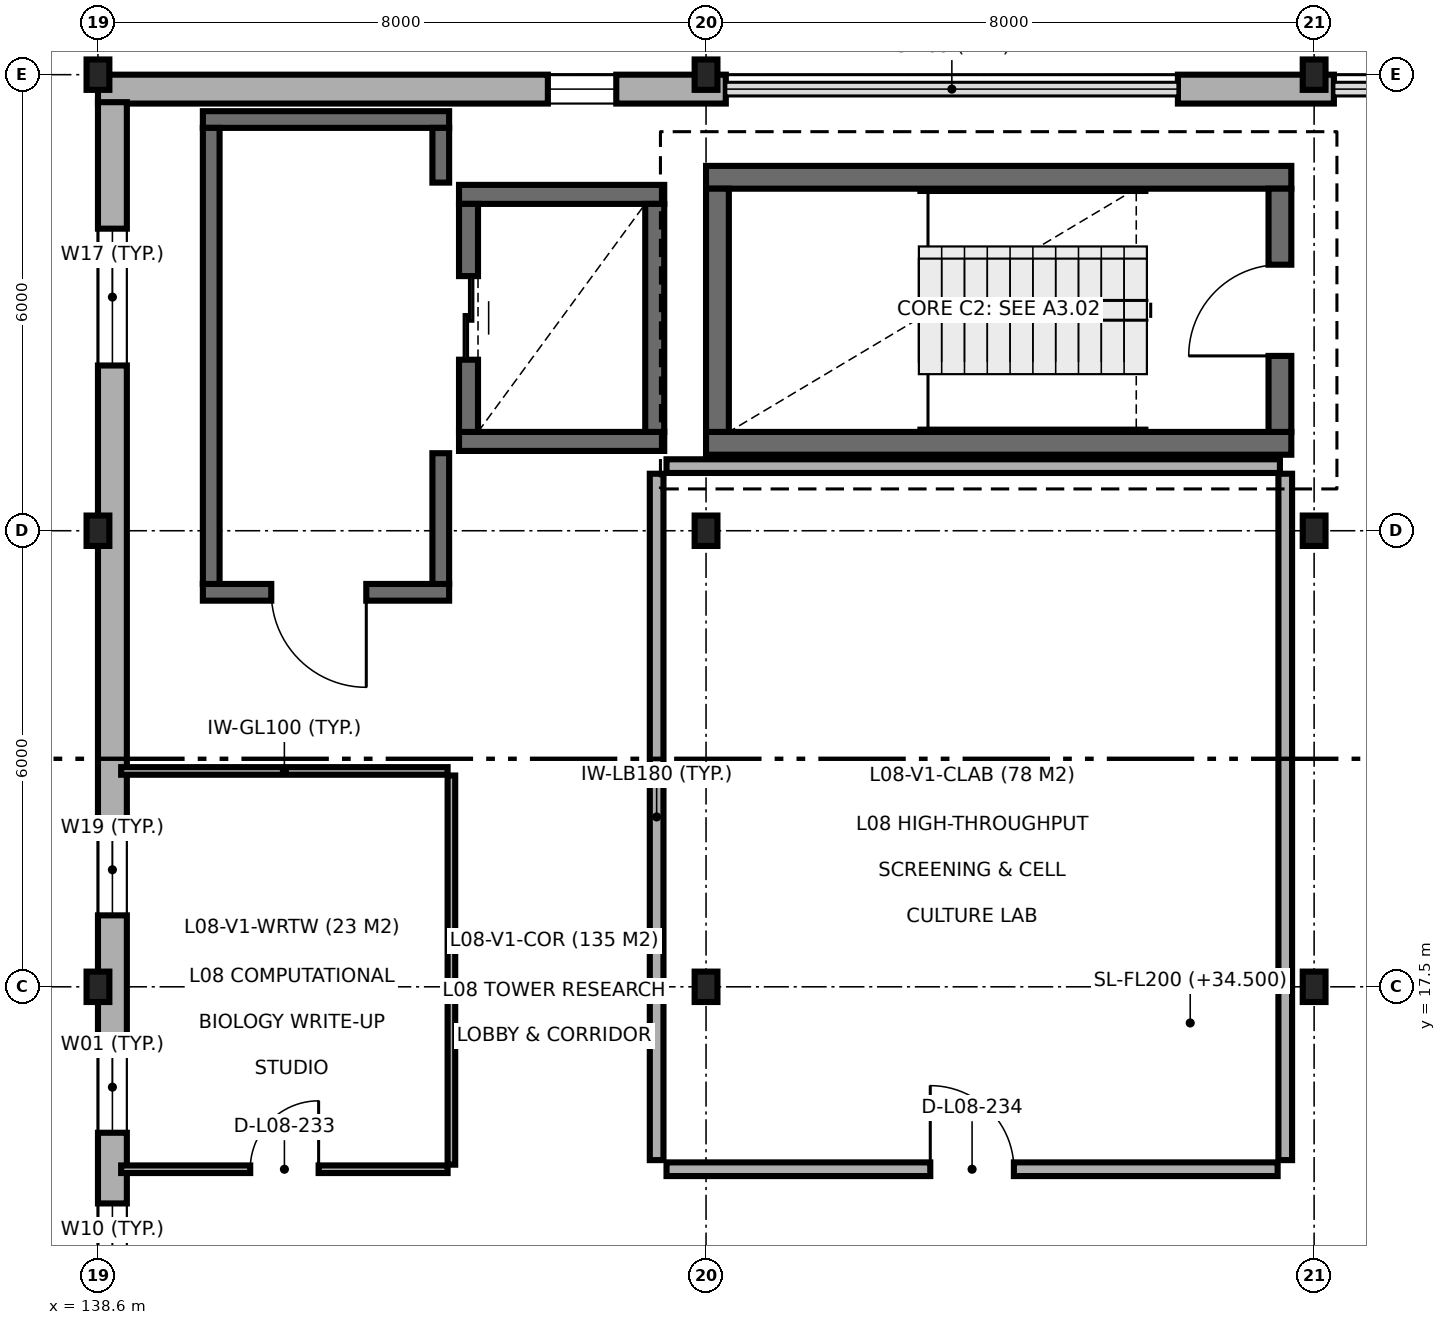
"""IFC4 building model, lengths in metres.
Left out: names, types, materials, properties, quantities, classifications, styles, units other than length and angle.
Written with IfcOpenShell. Run it as: python <this file> out.ifc"""

import sys

from ifc_helpers import new_model, si_unit, direction, frame, frame_2d, origin, origin_2d, place, context, subcontext, project, spatial, rectangle, i_section, extrude, element, fill, save


model = new_model("IFC4")
c1 = context("Model", 3, precision=1e-05, world=origin(), true_north=direction((0.0, 1.0)))
c2 = subcontext(c1, "Body", "Model", "MODEL_VIEW")
j1 = project(units=[si_unit("LENGTHUNIT", "METRE"), si_unit("PLANEANGLEUNIT", "RADIAN")], contexts=[c1])
p1 = place(None, origin())
s1 = spatial("IfcSite", under=j1, at=p1, CompositionType="ELEMENT")
p2 = place(p1, origin())
s2 = spatial("IfcBuilding", under=s1, at=p2, CompositionType="ELEMENT")
p3 = place(p2, frame((0.0, 0.0, 34.5)))
s3 = spatial("IfcBuildingStorey", under=s2, at=p3, CompositionType="ELEMENT", Elevation=34.5)
for number, where, z_axis, x_axis in (
    (1, (138.6, 17.5, 0.0), (0.0, 0.0, 1.0), (1.0, 0.0, 0.0)),
    (2, (138.6, 23.5, 0.0), (0.0, 0.0, 1.0), (1.0, 0.0, 0.0)),
    (3, (138.6, 29.5, 0.0), (0.0, 0.0, 1.0), (1.0, 0.0, 0.0)),
    (4, (146.6, 17.5, 0.0), (0.0, 0.0, 1.0), (1.0, 0.0, 0.0)),
    (5, (146.6, 23.5, 0.0), (0.0, 0.0, 1.0), (1.0, 0.0, 0.0)),
    (6, (146.6, 29.5, 0.0), (0.0, 0.0, 1.0), (1.0, 0.0, 0.0)),
    (7, (154.6, 17.5, 0.0), (0.0, 0.0, 1.0), (1.0, 0.0, 0.0)),
    (8, (154.6, 23.5, 0.0), (0.0, 0.0, 1.0), (1.0, 0.0, 0.0)),
    (9, (154.6, 29.5, 0.0), (0.0, 0.0, 1.0), (1.0, 0.0, 0.0)),
):
    element("IfcColumn", number, at=place(p3, frame(where, z_axis=z_axis, x_axis=x_axis)), inside=s3, PredefinedType="COLUMN", context=c2, shape_type="SweptSolid", body=[
        extrude(i_section(OverallWidth=0.3, OverallDepth=0.4, WebThickness=0.013, FlangeThickness=0.024, FilletRadius=0.027, at=origin_2d()), origin(), (0.0, 0.0, 1.0), 3.9),
    ])
for number, where, z_axis, x_axis in (
    (10, (146.6, 24.65, 0.0), (0.0, 0.0, 1.0), (1.0, 0.0, 0.0)),
    (11, (154.3, 28.15, 0.0), (0.0, 0.0, 1.0), (-1.0, 0.0, 0.0)),
):
    element("IfcWall", number, at=place(p3, frame(where, z_axis=z_axis, x_axis=x_axis)), inside=s3, PredefinedType="SHEAR", context=c2, shape_type="SweptSolid", body=[
        extrude(rectangle(XDim=7.7, YDim=0.3, at=frame_2d((3.85, 0.0))), origin(), (0.0, 0.0, 1.0), 3.9),
    ])
p4 = place(p3, frame((146.75, 28.0, 0.0), z_axis=(0.0, 0.0, 1.0), x_axis=(0.0, -1.0, 0.0)))
e12 = element("IfcWall", 12, at=p4, inside=s3, PredefinedType="SHEAR", context=c2, shape_type="SweptSolid", body=[
    extrude(rectangle(XDim=3.2, YDim=0.3, at=frame_2d((1.6, 0.0))), origin(), (0.0, 0.0, 1.0), 3.9),
])
p5 = place(p3, frame((154.15, 24.8, 0.0), z_axis=(0.0, 0.0, 1.0), x_axis=(0.0, 1.0, 0.0)))
e13 = element("IfcWall", 13, at=p5, inside=s3, PredefinedType="SHEAR", context=c2, shape_type="SweptSolid", body=[
    extrude(rectangle(XDim=3.2, YDim=0.3, at=frame_2d((1.6, 0.0))), origin(), (0.0, 0.0, 1.0), 3.9),
])
p6 = place(p5, frame((1.0, 0.0, 0.0)))
e14 = element("IfcOpeningElement", 14, at=p6, cuts=e13, PredefinedType="OPENING", context=c2, shape_type="SweptSolid", body=[
    extrude(rectangle(XDim=1.2, YDim=2.15, at=frame_2d((0.6, 1.075))), frame((0.0, 0.16, 0.0), z_axis=(0.0, -1.0, 0.0), x_axis=(1.0, 0.0, 0.0)), (0.0, 0.0, 1.0), 0.32),
])
for number, where, z_axis, x_axis in (
    (15, (143.35, 24.675, 0.0), (0.0, 0.0, 1.0), (1.0, 0.0, 0.0)),
    (16, (146.05, 27.925, 0.0), (0.0, 0.0, 1.0), (-1.0, 0.0, 0.0)),
):
    element("IfcWall", number, at=place(p3, frame(where, z_axis=z_axis, x_axis=x_axis)), inside=s3, PredefinedType="SHEAR", context=c2, shape_type="SweptSolid", body=[
        extrude(rectangle(XDim=2.7, YDim=0.25, at=frame_2d((1.35, 0.0))), origin(), (0.0, 0.0, 1.0), 3.9),
    ])
p7 = place(p3, frame((143.475, 27.8, 0.0), z_axis=(0.0, 0.0, 1.0), x_axis=(0.0, -1.0, 0.0)))
e17 = element("IfcWall", 17, at=p7, inside=s3, PredefinedType="SHEAR", context=c2, shape_type="SweptSolid", body=[
    extrude(rectangle(XDim=3.0, YDim=0.25, at=frame_2d((1.5, 0.0))), origin(), (0.0, 0.0, 1.0), 3.9),
])
p8 = place(p7, frame((0.95, 0.0, 0.0)))
e18 = element("IfcOpeningElement", 18, at=p8, cuts=e17, PredefinedType="OPENING", context=c2, shape_type="SweptSolid", body=[
    extrude(rectangle(XDim=1.1, YDim=2.15, at=frame_2d((0.55, 1.075))), frame((0.0, 0.135, 0.0), z_axis=(0.0, -1.0, 0.0), x_axis=(1.0, 0.0, 0.0)), (0.0, 0.0, 1.0), 0.27),
])
p9 = place(p3, frame((145.925, 24.8, 0.0), z_axis=(0.0, 0.0, 1.0), x_axis=(0.0, 1.0, 0.0)))
e19 = element("IfcWall", 19, at=p9, inside=s3, PredefinedType="SHEAR", context=c2, shape_type="SweptSolid", body=[
    extrude(rectangle(XDim=3.0, YDim=0.25, at=frame_2d((1.5, 0.0))), origin(), (0.0, 0.0, 1.0), 3.9),
])
p10 = place(p3, frame((139.98, 22.69, 0.0), z_axis=(0.0, 0.0, 1.0), x_axis=(1.0, 0.0, 0.0)))
e20 = element("IfcWall", 20, at=p10, inside=s3, PredefinedType="SOLIDWALL", context=c2, shape_type="SweptSolid", body=[
    extrude(rectangle(XDim=3.24, YDim=0.22, at=frame_2d((1.62, 0.0))), origin(), (0.0, 0.0, 1.0), 3.7),
])
p11 = place(p10, frame((0.9, 0.0, 0.0)))
e21 = element("IfcOpeningElement", 21, at=p11, cuts=e20, PredefinedType="OPENING", context=c2, shape_type="SweptSolid", body=[
    extrude(rectangle(XDim=1.25, YDim=2.15, at=frame_2d((0.625, 1.075))), frame((0.0, 0.12, 0.0), z_axis=(0.0, -1.0, 0.0), x_axis=(1.0, 0.0, 0.0)), (0.0, 0.0, 1.0), 0.24),
])
p12 = place(p3, frame((143.22, 28.91, 0.0), z_axis=(0.0, 0.0, 1.0), x_axis=(-1.0, 0.0, 0.0)))
e22 = element("IfcWall", 22, at=p12, inside=s3, PredefinedType="SOLIDWALL", context=c2, shape_type="SweptSolid", body=[
    extrude(rectangle(XDim=3.24, YDim=0.22, at=frame_2d((1.62, 0.0))), origin(), (0.0, 0.0, 1.0), 3.7),
])
p13 = place(p3, frame((140.09, 28.8, 0.0), z_axis=(0.0, 0.0, 1.0), x_axis=(0.0, -1.0, 0.0)))
e23 = element("IfcWall", 23, at=p13, inside=s3, PredefinedType="SOLIDWALL", context=c2, shape_type="SweptSolid", body=[
    extrude(rectangle(XDim=6.0, YDim=0.22, at=frame_2d((3.0, 0.0))), origin(), (0.0, 0.0, 1.0), 3.7),
])
p14 = place(p3, frame((143.11, 22.8, 0.0), z_axis=(0.0, 0.0, 1.0), x_axis=(0.0, 1.0, 0.0)))
e24 = element("IfcWall", 24, at=p14, inside=s3, PredefinedType="SOLIDWALL", context=c2, shape_type="SweptSolid", body=[
    extrude(rectangle(XDim=1.72, YDim=0.22, at=frame_2d((0.86, 0.0))), origin(), (0.0, 0.0, 1.0), 3.7),
])
p15 = place(p3, frame((143.11, 28.08, 0.0), z_axis=(0.0, 0.0, 1.0), x_axis=(0.0, 1.0, 0.0)))
e25 = element("IfcWall", 25, at=p15, inside=s3, PredefinedType="SOLIDWALL", context=c2, shape_type="SweptSolid", body=[
    extrude(rectangle(XDim=0.72, YDim=0.22, at=frame_2d((0.36, 0.0))), origin(), (0.0, 0.0, 1.0), 3.7),
])
p16 = place(p3, frame((154.86, 29.31, 0.0), z_axis=(0.0, 0.0, 1.0), x_axis=(-1.0, 0.0, 0.0)))
e26 = element("IfcWall", 26, at=p16, inside=s3, PredefinedType="SOLIDWALL", context=c2, shape_type="SweptSolid", body=[
    extrude(rectangle(XDim=2.052, YDim=0.38, at=frame_2d((1.026, 0.0))), origin(), (0.0, 0.0, 1.0), 3.7),
])
p17 = place(p3, frame((146.86, 29.31, 0.0), z_axis=(0.0, 0.0, 1.0), x_axis=(-1.0, 0.0, 0.0)))
e27 = element("IfcWall", 27, at=p17, inside=s3, PredefinedType="SOLIDWALL", context=c2, shape_type="SweptSolid", body=[
    extrude(rectangle(XDim=8.26, YDim=0.38, at=frame_2d((4.13, 0.0))), origin(), (0.0, 0.0, 1.0), 3.7),
])
p18 = place(p17, frame((1.441, 0.0, 0.9)))
e28 = element("IfcOpeningElement", 28, at=p18, cuts=e27, PredefinedType="OPENING", context=c2, shape_type="SweptSolid", body=[
    extrude(rectangle(XDim=0.9, YDim=1.8, at=frame_2d((0.45, 0.9))), frame((0.0, 0.2, 0.0), z_axis=(0.0, -1.0, 0.0), x_axis=(1.0, 0.0, 0.0)), (0.0, 0.0, 1.0), 0.4),
])
p19 = place(p3, frame((138.79, 29.138, 0.0), z_axis=(0.0, 0.0, 1.0), x_axis=(0.0, -1.0, 0.0)))
e29 = element("IfcWall", 29, at=p19, inside=s3, PredefinedType="SOLIDWALL", context=c2, shape_type="SweptSolid", body=[
    extrude(rectangle(XDim=24.238, YDim=0.38, at=frame_2d((12.119, 0.0))), origin(), (0.0, 0.0, 1.0), 3.7),
])
p20 = place(p19, frame((1.664, 0.0, 0.9)))
e30 = element("IfcOpeningElement", 30, at=p20, cuts=e29, PredefinedType="OPENING", context=c2, shape_type="SweptSolid", body=[
    extrude(rectangle(XDim=1.8, YDim=1.5, at=frame_2d((0.9, 0.75))), frame((0.0, 0.2, 0.0), z_axis=(0.0, -1.0, 0.0), x_axis=(1.0, 0.0, 0.0)), (0.0, 0.0, 1.0), 0.4),
])
p21 = place(p19, frame((9.498, 0.0, 0.9)))
e31 = element("IfcOpeningElement", 31, at=p21, cuts=e29, PredefinedType="OPENING", context=c2, shape_type="SweptSolid", body=[
    extrude(rectangle(XDim=1.2, YDim=2.4, at=frame_2d((0.6, 1.2))), frame((0.0, 0.2, 0.0), z_axis=(0.0, -1.0, 0.0), x_axis=(1.0, 0.0, 0.0)), (0.0, 0.0, 1.0), 0.4),
])
p22 = place(p19, frame((12.358, 0.0, 0.9)))
e32 = element("IfcOpeningElement", 32, at=p22, cuts=e29, PredefinedType="OPENING", context=c2, shape_type="SweptSolid", body=[
    extrude(rectangle(XDim=1.2, YDim=1.8, at=frame_2d((0.6, 0.9))), frame((0.0, 0.2, 0.0), z_axis=(0.0, -1.0, 0.0), x_axis=(1.0, 0.0, 0.0)), (0.0, 0.0, 1.0), 0.4),
])
p23 = place(p19, frame((14.488, 0.0, 0.9)))
e33 = element("IfcOpeningElement", 33, at=p23, cuts=e29, PredefinedType="OPENING", context=c2, shape_type="SweptSolid", body=[
    extrude(rectangle(XDim=1.8, YDim=2.1, at=frame_2d((0.9, 1.05))), frame((0.0, 0.2, 0.0), z_axis=(0.0, -1.0, 0.0), x_axis=(1.0, 0.0, 0.0)), (0.0, 0.0, 1.0), 0.4),
])
p24 = place(p19, frame((20.178, 0.0, 0.9)))
e34 = element("IfcOpeningElement", 34, at=p24, cuts=e29, PredefinedType="OPENING", context=c2, shape_type="SweptSolid", body=[
    extrude(rectangle(XDim=0.9, YDim=1.4, at=frame_2d((0.45, 0.7))), frame((0.0, 0.2, 0.0), z_axis=(0.0, -1.0, 0.0), x_axis=(1.0, 0.0, 0.0)), (0.0, 0.0, 1.0), 0.4),
])
p25 = place(p3, frame((138.905, 20.34, 0.0), z_axis=(0.0, 0.0, 1.0), x_axis=(1.0, 0.0, 0.0)))
e35 = element("IfcWall", 35, at=p25, inside=s3, PredefinedType="PARTITIONING", context=c2, shape_type="SweptSolid", body=[
    extrude(rectangle(XDim=4.295, YDim=0.1, at=frame_2d((2.147, 0.0))), origin(), (0.0, 0.0, 1.0), 3.7),
])
p26 = place(p3, frame((143.25, 15.16, 0.0), z_axis=(0.0, 0.0, 1.0), x_axis=(0.0, 1.0, 0.0)))
e36 = element("IfcWall", 36, at=p26, inside=s3, PredefinedType="PARTITIONING", context=c2, shape_type="SweptSolid", body=[
    extrude(rectangle(XDim=5.12, YDim=0.1, at=frame_2d((2.56, 0.0))), origin(), (0.0, 0.0, 1.0), 3.7),
])
p27 = place(p3, frame((138.905, 15.1, 0.0), z_axis=(0.0, 0.0, 1.0), x_axis=(1.0, 0.0, 0.0)))
e37 = element("IfcWall", 37, at=p27, inside=s3, PredefinedType="PARTITIONING", context=c2, shape_type="SweptSolid", body=[
    extrude(rectangle(XDim=4.295, YDim=0.1, at=frame_2d((2.147, 0.0))), origin(), (0.0, 0.0, 1.0), 3.7),
])
p28 = place(p27, frame((1.698, 0.0, 0.0)))
e38 = element("IfcOpeningElement", 38, at=p28, cuts=e37, PredefinedType="OPENING", context=c2, shape_type="SweptSolid", body=[
    extrude(rectangle(XDim=0.9, YDim=2.1, at=frame_2d((0.45, 1.05))), frame((0.0, 0.06, 0.0), z_axis=(0.0, -1.0, 0.0), x_axis=(1.0, 0.0, 0.0)), (0.0, 0.0, 1.0), 0.12),
])
p29 = place(p3, frame((145.95, 15.22, 0.0), z_axis=(0.0, 0.0, 1.0), x_axis=(0.0, 1.0, 0.0)))
e39 = element("IfcWall", 39, at=p29, inside=s3, PredefinedType="PARTITIONING", context=c2, shape_type="SweptSolid", body=[
    extrude(rectangle(XDim=9.03, YDim=0.18, at=frame_2d((4.515, 0.0))), origin(), (0.0, 0.0, 1.0), 3.7),
])
p30 = place(p3, frame((146.08, 24.35, 0.0), z_axis=(0.0, 0.0, 1.0), x_axis=(1.0, 0.0, 0.0)))
e40 = element("IfcWall", 40, at=p30, inside=s3, PredefinedType="PARTITIONING", context=c2, shape_type="SweptSolid", body=[
    extrude(rectangle(XDim=8.07, YDim=0.18, at=frame_2d((4.035, 0.0))), origin(), (0.0, 0.0, 1.0), 2.88),
])
p31 = place(p3, frame((154.22, 15.22, 0.0), z_axis=(0.0, 0.0, 1.0), x_axis=(0.0, 1.0, 0.0)))
e41 = element("IfcWall", 41, at=p31, inside=s3, PredefinedType="PARTITIONING", context=c2, shape_type="SweptSolid", body=[
    extrude(rectangle(XDim=9.03, YDim=0.18, at=frame_2d((4.515, 0.0))), origin(), (0.0, 0.0, 1.0), 3.7),
])
p32 = place(p3, frame((146.08, 15.1, 0.0), z_axis=(0.0, 0.0, 1.0), x_axis=(1.0, 0.0, 0.0)))
e42 = element("IfcWall", 42, at=p32, inside=s3, PredefinedType="PARTITIONING", context=c2, shape_type="SweptSolid", body=[
    extrude(rectangle(XDim=8.04, YDim=0.18, at=frame_2d((4.02, 0.0))), origin(), (0.0, 0.0, 1.0), 3.7),
])
p33 = place(p32, frame((3.47, 0.0, 0.0)))
e43 = element("IfcOpeningElement", 43, at=p33, cuts=e42, PredefinedType="OPENING", context=c2, shape_type="SweptSolid", body=[
    extrude(rectangle(XDim=1.1, YDim=2.15, at=frame_2d((0.55, 1.075))), frame((0.0, 0.1, 0.0), z_axis=(0.0, -1.0, 0.0), x_axis=(1.0, 0.0, 0.0)), (0.0, 0.0, 1.0), 0.2),
])
p34 = place(p6, origin())
e44 = element("IfcDoor", 44, at=p34, inside=s3, OperationType="SINGLE_SWING_LEFT", PredefinedType="DOOR", context=c2, shape_type="SweptSolid", body=[
    extrude(rectangle(XDim=1.2, YDim=2.15, at=frame_2d((0.6, 1.075))), frame((0.0, 0.025, 0.0), z_axis=(0.0, -1.0, 0.0), x_axis=(1.0, 0.0, 0.0)), (0.0, 0.0, 1.0), 0.05),
])
fill(e14, e44)
p35 = place(p8, origin())
e45 = element("IfcDoor", 45, at=p35, inside=s3, OperationType="DOUBLE_DOOR_SLIDING", PredefinedType="DOOR", context=c2, shape_type="SweptSolid", body=[
    extrude(rectangle(XDim=1.1, YDim=2.15, at=frame_2d((0.55, 1.075))), frame((0.0, 0.025, 0.0), z_axis=(0.0, -1.0, 0.0), x_axis=(1.0, 0.0, 0.0)), (0.0, 0.0, 1.0), 0.05),
])
fill(e18, e45)
p36 = place(p11, frame((1.25, 0.0, 0.0), z_axis=(0.0, 0.0, 1.0), x_axis=(-1.0, 0.0, 0.0)))
e46 = element("IfcDoor", 46, at=p36, inside=s3, OperationType="SINGLE_SWING_RIGHT", PredefinedType="DOOR", context=c2, shape_type="SweptSolid", body=[
    extrude(rectangle(XDim=1.25, YDim=2.15, at=frame_2d((0.625, 1.075))), frame((0.0, 0.025, 0.0), z_axis=(0.0, -1.0, 0.0), x_axis=(1.0, 0.0, 0.0)), (0.0, 0.0, 1.0), 0.05),
])
fill(e21, e46)
p37 = place(p18, origin())
e47 = element("IfcWindow", 47, at=p37, inside=s3, PartitioningType="SINGLE_PANEL", PredefinedType="WINDOW", context=c2, shape_type="SweptSolid", body=[
    extrude(rectangle(XDim=0.9, YDim=1.8, at=frame_2d((0.45, 0.9))), frame((0.0, 0.03, 0.0), z_axis=(0.0, -1.0, 0.0), x_axis=(1.0, 0.0, 0.0)), (0.0, 0.0, 1.0), 0.06),
])
fill(e28, e47)
p38 = place(p20, origin())
e48 = element("IfcWindow", 48, at=p38, inside=s3, PartitioningType="SINGLE_PANEL", PredefinedType="WINDOW", context=c2, shape_type="SweptSolid", body=[
    extrude(rectangle(XDim=1.8, YDim=1.5, at=frame_2d((0.9, 0.75))), frame((0.0, 0.03, 0.0), z_axis=(0.0, -1.0, 0.0), x_axis=(1.0, 0.0, 0.0)), (0.0, 0.0, 1.0), 0.06),
])
fill(e30, e48)
p39 = place(p21, origin())
e49 = element("IfcWindow", 49, at=p39, inside=s3, PartitioningType="SINGLE_PANEL", PredefinedType="WINDOW", context=c2, shape_type="SweptSolid", body=[
    extrude(rectangle(XDim=1.2, YDim=2.4, at=frame_2d((0.6, 1.2))), frame((0.0, 0.03, 0.0), z_axis=(0.0, -1.0, 0.0), x_axis=(1.0, 0.0, 0.0)), (0.0, 0.0, 1.0), 0.06),
])
fill(e31, e49)
p40 = place(p22, origin())
e50 = element("IfcWindow", 50, at=p40, inside=s3, PartitioningType="SINGLE_PANEL", PredefinedType="WINDOW", context=c2, shape_type="SweptSolid", body=[
    extrude(rectangle(XDim=1.2, YDim=1.8, at=frame_2d((0.6, 0.9))), frame((0.0, 0.03, 0.0), z_axis=(0.0, -1.0, 0.0), x_axis=(1.0, 0.0, 0.0)), (0.0, 0.0, 1.0), 0.06),
])
fill(e32, e50)
p41 = place(p23, origin())
e51 = element("IfcWindow", 51, at=p41, inside=s3, PartitioningType="SINGLE_PANEL", PredefinedType="WINDOW", context=c2, shape_type="SweptSolid", body=[
    extrude(rectangle(XDim=1.8, YDim=2.1, at=frame_2d((0.9, 1.05))), frame((0.0, 0.03, 0.0), z_axis=(0.0, -1.0, 0.0), x_axis=(1.0, 0.0, 0.0)), (0.0, 0.0, 1.0), 0.06),
])
fill(e33, e51)
p42 = place(p28, origin())
e52 = element("IfcDoor", 52, at=p42, inside=s3, OperationType="SINGLE_SWING_RIGHT", PredefinedType="DOOR", context=c2, shape_type="SweptSolid", body=[
    extrude(rectangle(XDim=0.9, YDim=2.1, at=frame_2d((0.45, 1.05))), frame((0.0, 0.025, 0.0), z_axis=(0.0, -1.0, 0.0), x_axis=(1.0, 0.0, 0.0)), (0.0, 0.0, 1.0), 0.05),
])
fill(e38, e52)
p43 = place(p33, origin())
e53 = element("IfcDoor", 53, at=p43, inside=s3, OperationType="SINGLE_SWING_LEFT", PredefinedType="DOOR", context=c2, shape_type="SweptSolid", body=[
    extrude(rectangle(XDim=1.1, YDim=2.15, at=frame_2d((0.55, 1.075))), frame((0.0, 0.025, 0.0), z_axis=(0.0, -1.0, 0.0), x_axis=(1.0, 0.0, 0.0)), (0.0, 0.0, 1.0), 0.05),
])
fill(e43, e53)
save(model, sys.argv[1])
